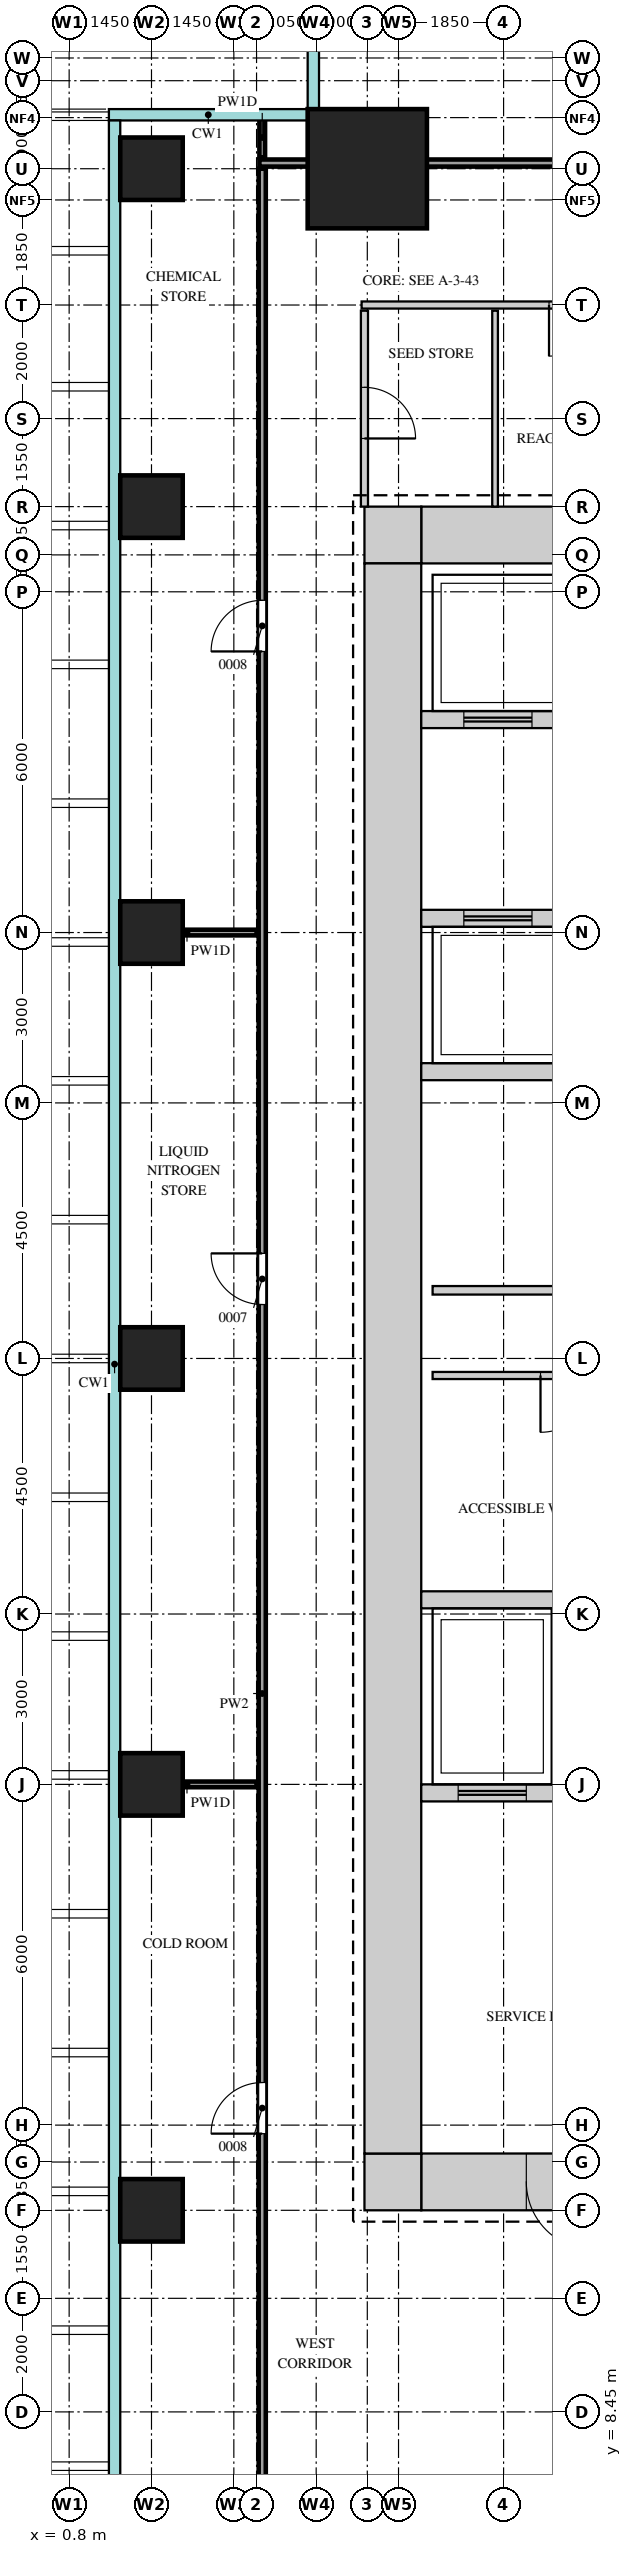
"""IFC4 building model, lengths in metres.
Left out: names, types, materials, properties, quantities, classifications, styles, units other than length and angle.
Written with IfcOpenShell. Run it as: python <this file> out.ifc"""

import sys

from ifc_helpers import new_model, si_unit, direction, frame, frame_2d, origin, origin_2d, place, context, subcontext, project, spatial, rectangle, extrude, source, transform, mapped, element, fill, save


model = new_model("IFC4")
c1 = context("Model", 3, precision=1e-05, world=origin(), true_north=direction((0.0, 1.0)))
c2 = subcontext(c1, "Body", "Model", "MODEL_VIEW")
j1 = project(units=[si_unit("LENGTHUNIT", "METRE"), si_unit("PLANEANGLEUNIT", "RADIAN")], contexts=[c1])
p1 = place(None, origin())
s1 = spatial("IfcSite", under=j1, at=p1, CompositionType="ELEMENT")
p2 = place(p1, origin())
s2 = spatial("IfcBuilding", under=s1, at=p2, CompositionType="ELEMENT")
p3 = place(p2, frame((0.0, 0.0, 101.5)))
s3 = spatial("IfcBuildingStorey", under=s2, at=p3, CompositionType="ELEMENT", Elevation=101.5)
m1 = source(origin(), c2, "Body", "SweptSolid", [
    extrude(rectangle(XDim=6.9, YDim=1.0, at=frame_2d((3.45, 0.0))), origin(), (0.0, 0.0, 1.0), 4.1),
])
p4 = place(p3, frame((7.0, 41.5, 0.0), z_axis=(0.0, 0.0, 1.0), x_axis=(1.0, 0.0, 0.0)))
e1 = element("IfcWall", 1, at=p4, inside=s3, PredefinedType="SHEAR", context=c2, shape_type="MappedRepresentation", body=[
    mapped(m1, transform((0.0, 0.0, 0.0))),
])
m2 = source(origin(), c2, "Body", "SweptSolid", [
    extrude(rectangle(XDim=1.0, YDim=1.0, at=frame_2d((0.5, 0.0))), origin(), (0.0, 0.0, 1.0), 4.1),
])
p5 = place(p3, frame((6.0, 41.5, 0.0), z_axis=(0.0, 0.0, 1.0), x_axis=(1.0, 0.0, 0.0)))
e2 = element("IfcWall", 2, at=p5, inside=s3, PredefinedType="SHEAR", context=c2, shape_type="MappedRepresentation", body=[
    mapped(m2, transform((0.0, 0.0, 0.0))),
])
p6 = place(p3, frame((7.0, 12.5, 0.0), z_axis=(0.0, 0.0, 1.0), x_axis=(1.0, 0.0, 0.0)))
e3 = element("IfcWall", 3, at=p6, inside=s3, PredefinedType="SHEAR", context=c2, shape_type="MappedRepresentation", body=[
    mapped(m1, transform((0.0, 0.0, 0.0))),
])
m3 = source(origin(), c2, "Body", "SweptSolid", [
    extrude(rectangle(XDim=1.2, YDim=2.1, at=frame_2d((0.6, 1.05))), frame((0.0, 0.51, 0.0), z_axis=(0.0, -1.0, 0.0), x_axis=(1.0, 0.0, 0.0)), (0.0, 0.0, 1.0), 1.02),
])
p7 = place(p6, frame((5.2, 0.0, 0.0)))
e4 = element("IfcOpeningElement", 4, at=p7, cuts=e3, PredefinedType="OPENING", context=c2, shape_type="MappedRepresentation", body=[
    mapped(m3, transform((0.0, 0.0, 0.0))),
])
p8 = place(p6, frame((1.85, 0.0, 0.0)))
e5 = element("IfcOpeningElement", 5, at=p8, cuts=e3, PredefinedType="OPENING", context=c2, shape_type="MappedRepresentation", body=[
    mapped(m3, transform((0.0, 0.0, 0.0))),
])
p9 = place(p3, frame((6.0, 12.5, 0.0), z_axis=(0.0, 0.0, 1.0), x_axis=(1.0, 0.0, 0.0)))
e6 = element("IfcWall", 6, at=p9, inside=s3, PredefinedType="SHEAR", context=c2, shape_type="MappedRepresentation", body=[
    mapped(m2, transform((0.0, 0.0, 0.0))),
])
m4 = source(origin(), c2, "Body", "SweptSolid", [
    extrude(rectangle(XDim=28.0, YDim=1.0, at=frame_2d((14.0, 0.0))), origin(), (0.0, 0.0, 1.0), 4.1),
])
p10 = place(p3, frame((6.5, 13.0, 0.0), z_axis=(0.0, 0.0, 1.0), x_axis=(0.0, 1.0, 0.0)))
e7 = element("IfcWall", 7, at=p10, inside=s3, PredefinedType="SHEAR", context=c2, shape_type="MappedRepresentation", body=[
    mapped(m4, transform((0.0, 0.0, 0.0))),
])
m5 = source(origin(), c2, "Body", "SweptSolid", [
    extrude(rectangle(XDim=13.2, YDim=0.3, at=frame_2d((6.6, 0.0))), origin(), (0.0, 0.0, 1.0), 4.1),
])
p11 = place(p3, frame((7.0, 22.75, 0.0), z_axis=(0.0, 0.0, 1.0), x_axis=(1.0, 0.0, 0.0)))
e8 = element("IfcWall", 8, at=p11, inside=s3, PredefinedType="STANDARD", context=c2, shape_type="MappedRepresentation", body=[
    mapped(m5, transform((0.0, 0.0, 0.0))),
])
m6 = source(origin(), c2, "Body", "SweptSolid", [
    extrude(rectangle(XDim=9.075, YDim=0.3, at=frame_2d((4.538, 0.0))), origin(), (0.0, 0.0, 1.0), 4.1),
])
p12 = place(p3, frame((7.0, 19.35, 0.0), z_axis=(0.0, 0.0, 1.0), x_axis=(1.0, 0.0, 0.0)))
e9 = element("IfcWall", 9, at=p12, inside=s3, PredefinedType="STANDARD", context=c2, shape_type="MappedRepresentation", body=[
    mapped(m6, transform((0.0, 0.0, 0.0))),
])
m7 = source(origin(), c2, "Body", "SweptSolid", [
    extrude(rectangle(XDim=1.2, YDim=2.1, at=frame_2d((0.6, 1.05))), frame((0.0, 0.16, 0.0), z_axis=(0.0, -1.0, 0.0), x_axis=(1.0, 0.0, 0.0)), (0.0, 0.0, 1.0), 0.32),
])
p13 = place(p12, frame((0.65, 0.0, 0.0)))
e10 = element("IfcOpeningElement", 10, at=p13, cuts=e9, PredefinedType="OPENING", context=c2, shape_type="MappedRepresentation", body=[
    mapped(m7, transform((0.0, 0.0, 0.0))),
])
p14 = place(p12, frame((3.0, 0.0, 0.0)))
e11 = element("IfcOpeningElement", 11, at=p14, cuts=e9, PredefinedType="OPENING", context=c2, shape_type="MappedRepresentation", body=[
    mapped(m7, transform((0.0, 0.0, 0.0))),
])
p15 = place(p12, frame((5.25, 0.0, 0.0)))
e12 = element("IfcOpeningElement", 12, at=p15, cuts=e9, PredefinedType="OPENING", context=c2, shape_type="MappedRepresentation", body=[
    mapped(m7, transform((0.0, 0.0, 0.0))),
])
p16 = place(p12, frame((7.4, 0.0, 0.0)))
e13 = element("IfcOpeningElement", 13, at=p16, cuts=e9, PredefinedType="OPENING", context=c2, shape_type="MappedRepresentation", body=[
    mapped(m7, transform((0.0, 0.0, 0.0))),
])
m8 = source(origin(), c2, "Body", "SweptSolid", [
    extrude(rectangle(XDim=16.0, YDim=0.3, at=frame_2d((8.0, 0.0))), origin(), (0.0, 0.0, 1.0), 4.1),
])
p17 = place(p3, frame((7.0, 32.05, 0.0), z_axis=(0.0, 0.0, 1.0), x_axis=(1.0, 0.0, 0.0)))
e14 = element("IfcWall", 14, at=p17, inside=s3, PredefinedType="STANDARD", context=c2, shape_type="MappedRepresentation", body=[
    mapped(m8, transform((0.0, 0.0, 0.0))),
])
p18 = place(p3, frame((7.0, 38.25, 0.0), z_axis=(0.0, 0.0, 1.0), x_axis=(1.0, 0.0, 0.0)))
e15 = element("IfcWall", 15, at=p18, inside=s3, PredefinedType="STANDARD", context=c2, shape_type="MappedRepresentation", body=[
    mapped(m8, transform((0.0, 0.0, 0.0))),
])
p19 = place(p18, frame((0.75, 0.0, 0.0)))
e16 = element("IfcOpeningElement", 16, at=p19, cuts=e15, PredefinedType="OPENING", context=c2, shape_type="MappedRepresentation", body=[
    mapped(m7, transform((0.0, 0.0, 0.0))),
])
p20 = place(p18, frame((3.3, 0.0, 0.0)))
e17 = element("IfcOpeningElement", 17, at=p20, cuts=e15, PredefinedType="OPENING", context=c2, shape_type="MappedRepresentation", body=[
    mapped(m7, transform((0.0, 0.0, 0.0))),
])
p21 = place(p18, frame((5.85, 0.0, 0.0)))
e18 = element("IfcOpeningElement", 18, at=p21, cuts=e15, PredefinedType="OPENING", context=c2, shape_type="MappedRepresentation", body=[
    mapped(m7, transform((0.0, 0.0, 0.0))),
])
p22 = place(p18, frame((8.4, 0.0, 0.0)))
e19 = element("IfcOpeningElement", 19, at=p22, cuts=e15, PredefinedType="OPENING", context=c2, shape_type="MappedRepresentation", body=[
    mapped(m7, transform((0.0, 0.0, 0.0))),
])
p23 = place(p3, frame((7.0, 34.75, 0.0), z_axis=(0.0, 0.0, 1.0), x_axis=(1.0, 0.0, 0.0)))
e20 = element("IfcWall", 20, at=p23, inside=s3, PredefinedType="STANDARD", context=c2, shape_type="MappedRepresentation", body=[
    mapped(m8, transform((0.0, 0.0, 0.0))),
])
p24 = place(p23, frame((0.75, 0.0, 0.0)))
e21 = element("IfcOpeningElement", 21, at=p24, cuts=e20, PredefinedType="OPENING", context=c2, shape_type="MappedRepresentation", body=[
    mapped(m7, transform((0.0, 0.0, 0.0))),
])
p25 = place(p23, frame((3.3, 0.0, 0.0)))
e22 = element("IfcOpeningElement", 22, at=p25, cuts=e20, PredefinedType="OPENING", context=c2, shape_type="MappedRepresentation", body=[
    mapped(m7, transform((0.0, 0.0, 0.0))),
])
p26 = place(p23, frame((5.85, 0.0, 0.0)))
e23 = element("IfcOpeningElement", 23, at=p26, cuts=e20, PredefinedType="OPENING", context=c2, shape_type="MappedRepresentation", body=[
    mapped(m7, transform((0.0, 0.0, 0.0))),
])
p27 = place(p23, frame((8.4, 0.0, 0.0)))
e24 = element("IfcOpeningElement", 24, at=p27, cuts=e20, PredefinedType="OPENING", context=c2, shape_type="MappedRepresentation", body=[
    mapped(m7, transform((0.0, 0.0, 0.0))),
])
m9 = source(origin(), c2, "Body", "SweptSolid", [
    extrude(rectangle(XDim=2.1, YDim=2.1, at=origin_2d()), origin(), (0.0, 0.0, 1.0), 4.4),
])
p28 = place(p3, frame((6.05, 47.95, 0.0), z_axis=(0.0, 0.0, 1.0), x_axis=(1.0, 0.0, 0.0)))
e25 = element("IfcColumn", 25, at=p28, inside=s3, PredefinedType="COLUMN", context=c2, shape_type="MappedRepresentation", body=[
    mapped(m9, transform((0.0, 0.0, 0.0))),
])
m10 = source(origin(), c2, "Body", "SweptSolid", [
    extrude(rectangle(XDim=1.1, YDim=1.1, at=origin_2d()), origin(), (0.0, 0.0, 1.0), 4.1),
])
for number, where, z_axis, x_axis in (
    (26, (2.25, 12.0, 0.0), (0.0, 0.0, 1.0), (1.0, 0.0, 0.0)),
    (27, (2.25, 19.5, 0.0), (0.0, 0.0, 1.0), (1.0, 0.0, 0.0)),
    (28, (2.25, 27.0, 0.0), (0.0, 0.0, 1.0), (1.0, 0.0, 0.0)),
    (29, (2.25, 34.5, 0.0), (0.0, 0.0, 1.0), (1.0, 0.0, 0.0)),
    (30, (2.25, 42.0, 0.0), (0.0, 0.0, 1.0), (1.0, 0.0, 0.0)),
    (31, (2.25, 47.95, 0.0), (0.0, 0.0, 1.0), (1.0, 0.0, 0.0)),
):
    element("IfcColumn", number, at=place(p3, frame(where, z_axis=z_axis, x_axis=x_axis)), inside=s3, PredefinedType="COLUMN", context=c2, shape_type="MappedRepresentation", body=[
        mapped(m10, transform((0.0, 0.0, 0.0))),
    ])
m11 = source(origin(), c2, "Body", "SweptSolid", [
    extrude(rectangle(XDim=41.8, YDim=0.125, at=frame_2d((20.9, 0.0))), origin(), (0.0, 0.0, 1.0), 4.2),
])
p29 = place(p3, frame((4.2, 6.15, 0.0), z_axis=(0.0, 0.0, 1.0), x_axis=(0.0, 1.0, 0.0)))
e32 = element("IfcWall", 32, at=p29, inside=s3, PredefinedType="PARTITIONING", context=c2, shape_type="MappedRepresentation", body=[
    mapped(m11, transform((0.0, 0.0, 0.0))),
])
m12 = source(origin(), c2, "Body", "SweptSolid", [
    extrude(rectangle(XDim=0.9, YDim=2.1, at=frame_2d((0.45, 1.05))), frame((0.0, 0.073, 0.0), z_axis=(0.0, -1.0, 0.0), x_axis=(1.0, 0.0, 0.0)), (0.0, 0.0, 1.0), 0.145),
])
p30 = place(p29, frame((7.2, 0.0, 0.0)))
e33 = element("IfcOpeningElement", 33, at=p30, cuts=e32, PredefinedType="OPENING", context=c2, shape_type="MappedRepresentation", body=[
    mapped(m12, transform((0.0, 0.0, 0.0))),
])
p31 = place(p29, frame((21.8, 0.0, 0.0)))
e34 = element("IfcOpeningElement", 34, at=p31, cuts=e32, PredefinedType="OPENING", context=c2, shape_type="MappedRepresentation", body=[
    mapped(m12, transform((0.0, 0.0, 0.0))),
])
p32 = place(p29, frame((33.3, 0.0, 0.0)))
e35 = element("IfcOpeningElement", 35, at=p32, cuts=e32, PredefinedType="OPENING", context=c2, shape_type="MappedRepresentation", body=[
    mapped(m12, transform((0.0, 0.0, 0.0))),
])
m13 = source(origin(), c2, "Body", "SweptSolid", [
    extrude(rectangle(XDim=2.45, YDim=0.1, at=frame_2d((1.225, 0.0))), origin(), (0.0, 0.0, 1.0), 4.2),
])
p33 = place(p3, frame((1.65, 19.5, 0.0), z_axis=(0.0, 0.0, 1.0), x_axis=(1.0, 0.0, 0.0)))
e36 = element("IfcWall", 36, at=p33, inside=s3, PredefinedType="PARTITIONING", context=c2, shape_type="MappedRepresentation", body=[
    mapped(m13, transform((0.0, 0.0, 0.0))),
])
m14 = source(origin(), c2, "Body", "SweptSolid", [
    extrude(rectangle(XDim=15.6, YDim=0.125, at=frame_2d((7.8, 0.0))), origin(), (0.0, 0.0, 1.0), 4.2),
])
p34 = place(p3, frame((7.2, 26.7, 0.0), z_axis=(0.0, 0.0, 1.0), x_axis=(1.0, 0.0, 0.0)))
e37 = element("IfcWall", 37, at=p34, inside=s3, PredefinedType="PARTITIONING", context=c2, shape_type="MappedRepresentation", body=[
    mapped(m14, transform((0.0, 0.0, 0.0))),
])
m15 = source(origin(), c2, "Body", "SweptSolid", [
    extrude(rectangle(XDim=1.0, YDim=2.1, at=frame_2d((0.5, 1.05))), frame((0.0, 0.073, 0.0), z_axis=(0.0, -1.0, 0.0), x_axis=(1.0, 0.0, 0.0)), (0.0, 0.0, 1.0), 0.145),
])
p35 = place(p34, frame((1.9, 0.0, 0.0)))
e38 = element("IfcOpeningElement", 38, at=p35, cuts=e37, PredefinedType="OPENING", context=c2, shape_type="MappedRepresentation", body=[
    mapped(m15, transform((0.0, 0.0, 0.0))),
])
p36 = place(p34, frame((7.05, 0.0, 0.0)))
e39 = element("IfcOpeningElement", 39, at=p36, cuts=e37, PredefinedType="OPENING", context=c2, shape_type="MappedRepresentation", body=[
    mapped(m12, transform((0.0, 0.0, 0.0))),
])
p37 = place(p34, frame((12.45, 0.0, 0.0)))
e40 = element("IfcOpeningElement", 40, at=p37, cuts=e37, PredefinedType="OPENING", context=c2, shape_type="MappedRepresentation", body=[
    mapped(m12, transform((0.0, 0.0, 0.0))),
])
m16 = source(origin(), c2, "Body", "SweptSolid", [
    extrude(rectangle(XDim=6.35, YDim=0.15, at=frame_2d((3.175, 0.0))), origin(), (0.0, 0.0, 1.0), 4.2),
])
p38 = place(p3, frame((7.2, 28.2, 0.0), z_axis=(0.0, 0.0, 1.0), x_axis=(1.0, 0.0, 0.0)))
e41 = element("IfcWall", 41, at=p38, inside=s3, PredefinedType="PARTITIONING", context=c2, shape_type="MappedRepresentation", body=[
    mapped(m16, transform((0.0, 0.0, 0.0))),
])
m17 = source(origin(), c2, "Body", "SweptSolid", [
    extrude(rectangle(XDim=0.9, YDim=2.1, at=frame_2d((0.45, 1.05))), frame((0.0, 0.085, 0.0), z_axis=(0.0, -1.0, 0.0), x_axis=(1.0, 0.0, 0.0)), (0.0, 0.0, 1.0), 0.17),
])
p39 = place(p38, frame((2.7, 0.0, 0.0)))
e42 = element("IfcOpeningElement", 42, at=p39, cuts=e41, PredefinedType="OPENING", context=c2, shape_type="MappedRepresentation", body=[
    mapped(m17, transform((0.0, 0.0, 0.0))),
])
p40 = place(p3, frame((1.65, 34.5, 0.0), z_axis=(0.0, 0.0, 1.0), x_axis=(1.0, 0.0, 0.0)))
e43 = element("IfcWall", 43, at=p40, inside=s3, PredefinedType="PARTITIONING", context=c2, shape_type="MappedRepresentation", body=[
    mapped(m13, transform((0.0, 0.0, 0.0))),
])
m18 = source(origin(), c2, "Body", "SweptSolid", [
    extrude(rectangle(XDim=3.45, YDim=0.125, at=frame_2d((1.725, 0.0))), origin(), (0.0, 0.0, 1.0), 4.2),
])
p41 = place(p3, frame((6.0, 42.0, 0.0), z_axis=(0.0, 0.0, 1.0), x_axis=(0.0, 1.0, 0.0)))
e44 = element("IfcWall", 44, at=p41, inside=s3, PredefinedType="PARTITIONING", context=c2, shape_type="MappedRepresentation", body=[
    mapped(m18, transform((0.0, 0.0, 0.0))),
])
p42 = place(p41, frame((1.2, 0.0, 0.0)))
e45 = element("IfcOpeningElement", 45, at=p42, cuts=e44, PredefinedType="OPENING", context=c2, shape_type="MappedRepresentation", body=[
    mapped(m12, transform((0.0, 0.0, 0.0))),
])
m19 = source(origin(), c2, "Body", "SweptSolid", [
    extrude(rectangle(XDim=3.45, YDim=0.1, at=frame_2d((1.725, 0.0))), origin(), (0.0, 0.0, 1.0), 4.2),
])
p43 = place(p3, frame((8.3, 42.0, 0.0), z_axis=(0.0, 0.0, 1.0), x_axis=(0.0, 1.0, 0.0)))
e46 = element("IfcWall", 46, at=p43, inside=s3, PredefinedType="PARTITIONING", context=c2, shape_type="MappedRepresentation", body=[
    mapped(m19, transform((0.0, 0.0, 0.0))),
])
m20 = source(origin(), c2, "Body", "SweptSolid", [
    extrude(rectangle(XDim=7.95, YDim=0.125, at=frame_2d((3.975, 0.0))), origin(), (0.0, 0.0, 1.0), 4.2),
])
p44 = place(p3, frame((5.95, 45.55, 0.0), z_axis=(0.0, 0.0, 1.0), x_axis=(1.0, 0.0, 0.0)))
e47 = element("IfcWall", 47, at=p44, inside=s3, PredefinedType="PARTITIONING", context=c2, shape_type="MappedRepresentation", body=[
    mapped(m20, transform((0.0, 0.0, 0.0))),
])
p45 = place(p44, frame((3.3, 0.0, 0.0)))
e48 = element("IfcOpeningElement", 48, at=p45, cuts=e47, PredefinedType="OPENING", context=c2, shape_type="MappedRepresentation", body=[
    mapped(m12, transform((0.0, 0.0, 0.0))),
])
p46 = place(p44, frame((6.1, 0.0, 0.0)))
e49 = element("IfcOpeningElement", 49, at=p46, cuts=e47, PredefinedType="OPENING", context=c2, shape_type="MappedRepresentation", body=[
    mapped(m12, transform((0.0, 0.0, 0.0))),
])
m21 = source(origin(), c2, "Body", "SweptSolid", [
    extrude(rectangle(XDim=42.2, YDim=0.125, at=frame_2d((21.1, 0.0))), origin(), (0.0, 0.0, 1.0), 3.55),
])
p47 = place(p3, frame((4.15, 48.05, 0.0), z_axis=(0.0, 0.0, 1.0), x_axis=(1.0, 0.0, 0.0)))
e50 = element("IfcWall", 50, at=p47, inside=s3, PredefinedType="PARTITIONING", context=c2, shape_type="MappedRepresentation", body=[
    mapped(m21, transform((0.0, 0.0, 0.0))),
])
p48 = place(p47, frame((7.25, 0.0, 0.0)))
e51 = element("IfcOpeningElement", 51, at=p48, cuts=e50, PredefinedType="OPENING", context=c2, shape_type="MappedRepresentation", body=[
    mapped(m12, transform((0.0, 0.0, 0.0))),
])
m22 = source(origin(), c2, "Body", "SweptSolid", [
    extrude(rectangle(XDim=1.2, YDim=2.1, at=frame_2d((0.6, 1.05))), frame((0.0, 0.073, 0.0), z_axis=(0.0, -1.0, 0.0), x_axis=(1.0, 0.0, 0.0)), (0.0, 0.0, 1.0), 0.145),
])
p49 = place(p47, frame((28.35, 0.0, 0.0)))
e52 = element("IfcOpeningElement", 52, at=p49, cuts=e50, PredefinedType="OPENING", context=c2, shape_type="MappedRepresentation", body=[
    mapped(m22, transform((0.0, 0.0, 0.0))),
])
m23 = source(origin(), c2, "Body", "SweptSolid", [
    extrude(rectangle(XDim=0.7, YDim=0.1, at=frame_2d((0.35, 0.0))), origin(), (0.0, 0.0, 1.0), 4.2),
])
p50 = place(p3, frame((4.2, 48.15, 0.0), z_axis=(0.0, 0.0, 1.0), x_axis=(0.0, 1.0, 0.0)))
e53 = element("IfcWall", 53, at=p50, inside=s3, PredefinedType="PARTITIONING", context=c2, shape_type="MappedRepresentation", body=[
    mapped(m23, transform((0.0, 0.0, 0.0))),
])
m24 = source(origin(), c2, "Body", "SweptSolid", [
    extrude(rectangle(XDim=1.0, YDim=2.1, at=frame_2d((0.5, 1.05))), frame((0.0, 0.025, 0.0), z_axis=(0.0, -1.0, 0.0), x_axis=(1.0, 0.0, 0.0)), (0.0, 0.0, 1.0), 0.05),
])
p51 = place(p35, origin())
e54 = element("IfcDoor", 54, at=p51, inside=s3, OperationType="SINGLE_SWING_LEFT", PredefinedType="DOOR", context=c2, shape_type="MappedRepresentation", body=[
    mapped(m24, transform((0.0, 0.0, 0.0))),
])
fill(e38, e54)
m25 = source(origin(), c2, "Body", "SweptSolid", [
    extrude(rectangle(XDim=1.2, YDim=2.1, at=frame_2d((0.6, 1.05))), frame((0.0, 0.45, 0.0), z_axis=(0.0, -1.0, 0.0), x_axis=(1.0, 0.0, 0.0)), (0.0, 0.0, 1.0), 0.9),
])
p52 = place(p8, origin())
e55 = element("IfcDoor", 55, at=p52, inside=s3, OperationType="SINGLE_SWING_RIGHT", PredefinedType="DOOR", context=c2, shape_type="MappedRepresentation", body=[
    mapped(m25, transform((0.0, 0.0, 0.0))),
])
fill(e5, e55)
m26 = source(origin(), c2, "Body", "SweptSolid", [
    extrude(rectangle(XDim=0.9, YDim=2.1, at=frame_2d((0.45, 1.05))), frame((0.0, 0.025, 0.0), z_axis=(0.0, -1.0, 0.0), x_axis=(1.0, 0.0, 0.0)), (0.0, 0.0, 1.0), 0.05),
])
p53 = place(p30, origin())
e56 = element("IfcDoor", 56, at=p53, inside=s3, OperationType="SINGLE_SWING_RIGHT", PredefinedType="DOOR", context=c2, shape_type="MappedRepresentation", body=[
    mapped(m26, transform((0.0, 0.0, 0.0))),
])
fill(e33, e56)
p54 = place(p31, origin())
e57 = element("IfcDoor", 57, at=p54, inside=s3, OperationType="SINGLE_SWING_LEFT", PredefinedType="DOOR", context=c2, shape_type="MappedRepresentation", body=[
    mapped(m26, transform((0.0, 0.0, 0.0))),
])
fill(e34, e57)
p55 = place(p32, origin())
e58 = element("IfcDoor", 58, at=p55, inside=s3, OperationType="SINGLE_SWING_RIGHT", PredefinedType="DOOR", context=c2, shape_type="MappedRepresentation", body=[
    mapped(m26, transform((0.0, 0.0, 0.0))),
])
fill(e35, e58)
p56 = place(p42, origin())
e59 = element("IfcDoor", 59, at=p56, inside=s3, OperationType="SINGLE_SWING_LEFT", PredefinedType="DOOR", context=c2, shape_type="MappedRepresentation", body=[
    mapped(m26, transform((0.0, 0.0, 0.0))),
])
fill(e45, e59)
p57 = place(p45, origin())
e60 = element("IfcDoor", 60, at=p57, inside=s3, OperationType="SINGLE_SWING_LEFT", PredefinedType="DOOR", context=c2, shape_type="MappedRepresentation", body=[
    mapped(m26, transform((0.0, 0.0, 0.0))),
])
fill(e48, e60)
m27 = source(origin(), c2, "Body", "SweptSolid", [
    extrude(rectangle(XDim=1.2, YDim=2.1, at=frame_2d((0.6, 1.05))), frame((0.0, 0.025, 0.0), z_axis=(0.0, -1.0, 0.0), x_axis=(1.0, 0.0, 0.0)), (0.0, 0.0, 1.0), 0.05),
])
p58 = place(p24, origin())
e61 = element("IfcDoor", 61, at=p58, inside=s3, OperationType="DOUBLE_DOOR_SLIDING", PredefinedType="DOOR", context=c2, shape_type="MappedRepresentation", body=[
    mapped(m27, transform((0.0, 0.0, 0.0))),
])
fill(e21, e61)
p59 = place(p19, origin())
e62 = element("IfcDoor", 62, at=p59, inside=s3, OperationType="DOUBLE_DOOR_SLIDING", PredefinedType="DOOR", context=c2, shape_type="MappedRepresentation", body=[
    mapped(m27, transform((0.0, 0.0, 0.0))),
])
fill(e16, e62)
p60 = place(p13, origin())
e63 = element("IfcDoor", 63, at=p60, inside=s3, OperationType="DOUBLE_DOOR_SLIDING", PredefinedType="DOOR", context=c2, shape_type="MappedRepresentation", body=[
    mapped(m27, transform((0.0, 0.0, 0.0))),
])
fill(e10, e63)
save(model, sys.argv[1])
